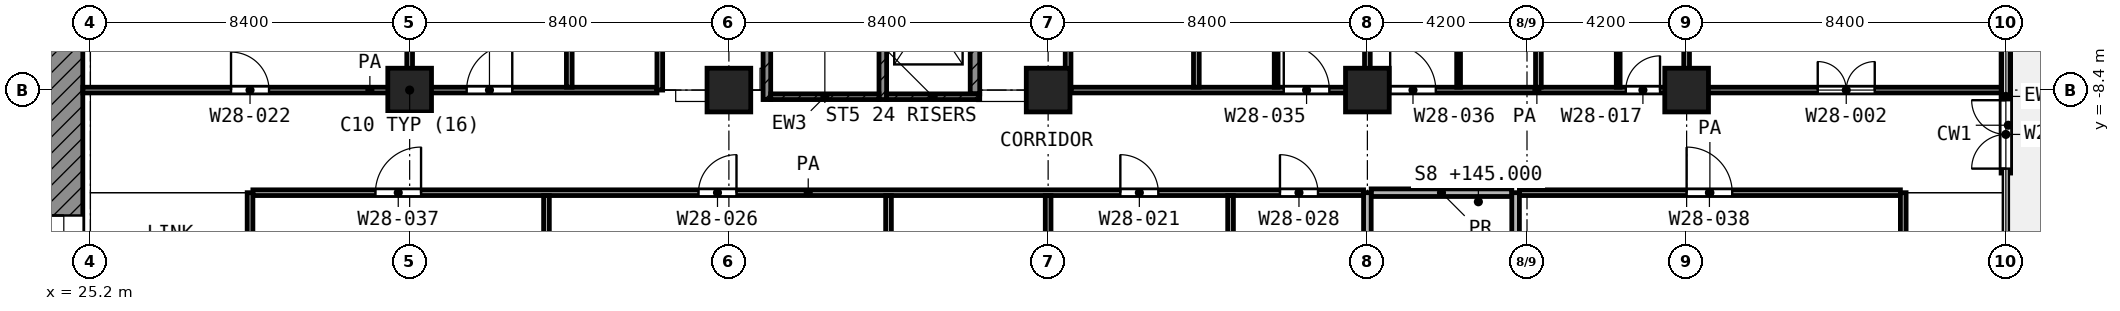
"""IFC4 building model, lengths in metres.
Left out: names, types, materials, properties, quantities, classifications, styles, units other than length and angle.
Written with IfcOpenShell. Run it as: python <this file> out.ifc"""

import sys

from ifc_helpers import new_model, si_unit, direction, frame, frame_2d, origin, origin_2d, place, context, subcontext, project, spatial, rectangle, extrude, element, fill, save


model = new_model("IFC4")
c1 = context("Model", 3, precision=1e-05, world=origin(), true_north=direction((0.0, 1.0)))
c2 = subcontext(c1, "Body", "Model", "MODEL_VIEW")
j1 = project(units=[si_unit("LENGTHUNIT", "METRE"), si_unit("PLANEANGLEUNIT", "RADIAN")], contexts=[c1])
p1 = place(None, origin())
s1 = spatial("IfcSite", under=j1, at=p1, CompositionType="ELEMENT")
p2 = place(p1, origin())
s2 = spatial("IfcBuilding", under=s1, at=p2, CompositionType="ELEMENT")
p3 = place(p2, frame((0.0, 0.0, 145.0)))
s3 = spatial("IfcBuildingStorey", under=s2, at=p3, CompositionType="ELEMENT", Elevation=145.0)
for number, where, z_axis, x_axis in (
    (1, (33.6, -8.4, 0.0), (0.0, 0.0, 1.0), (1.0, 0.0, 0.0)),
    (2, (42.0, -8.4, 0.0), (0.0, 0.0, 1.0), (1.0, 0.0, 0.0)),
    (3, (50.4, -8.4, 0.0), (0.0, 0.0, 1.0), (1.0, 0.0, 0.0)),
    (4, (58.8, -8.4, 0.0), (0.0, 0.0, 1.0), (1.0, 0.0, 0.0)),
    (5, (67.2, -8.4, 0.0), (0.0, 0.0, 1.0), (1.0, 0.0, 0.0)),
):
    element("IfcColumn", number, at=place(p3, frame(where, z_axis=z_axis, x_axis=x_axis)), inside=s3, PredefinedType="COLUMN", context=c2, shape_type="SweptSolid", body=[
        extrude(rectangle(XDim=1.15, YDim=1.15, at=origin_2d()), origin(), (0.0, 0.0, 1.0), 4.2),
    ])
p4 = place(p3, frame((75.6, -10.583, 0.0), z_axis=(0.0, 0.0, 1.0), x_axis=(0.0, 1.0, 0.0)))
e6 = element("IfcWall", 6, at=p4, inside=s3, PredefinedType="SOLIDWALL", context=c2, shape_type="SweptSolid", body=[
    extrude(rectangle(XDim=4.033, YDim=0.25, at=frame_2d((2.017, 0.0))), origin(), (0.0, 0.0, 1.0), 3.48),
])
p5 = place(p4, frame((0.117, 0.0, 0.0)))
e7 = element("IfcOpeningElement", 7, at=p5, cuts=e6, PredefinedType="OPENING", context=c2, shape_type="SweptSolid", body=[
    extrude(rectangle(XDim=1.8, YDim=2.1, at=frame_2d((0.9, 1.05))), frame((0.0, 0.135, 0.0), z_axis=(0.0, -1.0, 0.0), x_axis=(1.0, 0.0, 0.0)), (0.0, 0.0, 1.0), 0.27),
])
p6 = place(p3, frame((24.5, -24.0, 0.0), z_axis=(0.0, 0.0, 1.0), x_axis=(0.0, 1.0, 0.0)))
e8 = element("IfcWall", 8, at=p6, inside=s3, PredefinedType="SHEAR", context=c2, shape_type="SweptSolid", body=[
    extrude(rectangle(XDim=18.6, YDim=1.0, at=frame_2d((9.3, 0.0))), origin(), (0.0, 0.0, 1.0), 3.6),
])
p7 = place(p6, frame((10.5, 0.0, 0.0)))
e9 = element("IfcOpeningElement", 9, at=p7, cuts=e8, PredefinedType="OPENING", context=c2, shape_type="SweptSolid", body=[
    extrude(rectangle(XDim=1.8, YDim=2.1, at=frame_2d((0.9, 1.05))), frame((0.0, 0.51, 0.0), z_axis=(0.0, -1.0, 0.0), x_axis=(1.0, 0.0, 0.0)), (0.0, 0.0, 1.0), 1.02),
])
p8 = place(p3, frame((43.0, -8.65, 0.0), z_axis=(0.0, 0.0, 1.0), x_axis=(0.0, 1.0, 0.0)))
e10 = element("IfcWall", 10, at=p8, inside=s3, PredefinedType="SHEAR", context=c2, shape_type="SweptSolid", body=[
    extrude(rectangle(XDim=8.35, YDim=0.2, at=frame_2d((4.175, 0.0))), origin(), (0.0, 0.0, 1.0), 3.6),
])
p9 = place(p8, frame((7.0, 0.0, 0.0)))
e11 = element("IfcOpeningElement", 11, at=p9, cuts=e10, PredefinedType="OPENING", context=c2, shape_type="SweptSolid", body=[
    extrude(rectangle(XDim=1.1, YDim=2.1, at=frame_2d((0.55, 1.05))), frame((0.0, 0.11, 0.0), z_axis=(0.0, -1.0, 0.0), x_axis=(1.0, 0.0, 0.0)), (0.0, 0.0, 1.0), 0.22),
])
p10 = place(p3, frame((46.05, -8.65, 0.0), z_axis=(0.0, 0.0, 1.0), x_axis=(0.0, 1.0, 0.0)))
e12 = element("IfcWall", 12, at=p10, inside=s3, PredefinedType="SHEAR", context=c2, shape_type="SweptSolid", body=[
    extrude(rectangle(XDim=8.35, YDim=0.2, at=frame_2d((4.175, 0.0))), origin(), (0.0, 0.0, 1.0), 3.6),
])
p11 = place(p10, frame((7.0, 0.0, 0.0)))
e13 = element("IfcOpeningElement", 13, at=p11, cuts=e12, PredefinedType="OPENING", context=c2, shape_type="SweptSolid", body=[
    extrude(rectangle(XDim=1.1, YDim=2.1, at=frame_2d((0.55, 1.05))), frame((0.0, 0.11, 0.0), z_axis=(0.0, -1.0, 0.0), x_axis=(1.0, 0.0, 0.0)), (0.0, 0.0, 1.0), 0.22),
])
p12 = place(p3, frame((43.1, -8.575, 0.0), z_axis=(0.0, 0.0, 1.0), x_axis=(1.0, 0.0, 0.0)))
e14 = element("IfcWall", 14, at=p12, inside=s3, PredefinedType="SHEAR", context=c2, shape_type="SweptSolid", body=[
    extrude(rectangle(XDim=2.85, YDim=0.15, at=frame_2d((1.425, 0.0))), origin(), (0.0, 0.0, 1.0), 3.6),
])
p13 = place(p3, frame((46.15, -8.575, 0.0), z_axis=(0.0, 0.0, 1.0), x_axis=(1.0, 0.0, 0.0)))
e15 = element("IfcWall", 15, at=p13, inside=s3, PredefinedType="SHEAR", context=c2, shape_type="SweptSolid", body=[
    extrude(rectangle(XDim=2.45, YDim=0.15, at=frame_2d((1.225, 0.0))), origin(), (0.0, 0.0, 1.0), 3.6),
])
p14 = place(p3, frame((48.475, -8.5, 0.0), z_axis=(0.0, 0.0, 1.0), x_axis=(0.0, 1.0, 0.0)))
e16 = element("IfcWall", 16, at=p14, inside=s3, PredefinedType="SHEAR", context=c2, shape_type="SweptSolid", body=[
    extrude(rectangle(XDim=3.475, YDim=0.25, at=frame_2d((1.738, 0.0))), origin(), (0.0, 0.0, 1.0), 3.6),
])
for number, where, z_axis, x_axis in (
    (17, (56.4, -8.325, 0.0), (0.0, 0.0, 1.0), (0.0, 1.0, 0.0)),
    (18, (61.2, -8.325, 0.0), (0.0, 0.0, 1.0), (0.0, 1.0, 0.0)),
    (19, (65.4, -8.325, 0.0), (0.0, 0.0, 1.0), (0.0, 1.0, 0.0)),
):
    element("IfcWall", number, at=place(p3, frame(where, z_axis=z_axis, x_axis=x_axis)), inside=s3, PredefinedType="PARTITIONING", context=c2, shape_type="SweptSolid", body=[
        extrude(rectangle(XDim=2.625, YDim=0.1, at=frame_2d((1.312, 0.0))), origin(), (0.0, 0.0, 1.0), 3.6),
    ])
p15 = place(p3, frame((29.475, -11.1, 0.0), z_axis=(0.0, 0.0, 1.0), x_axis=(1.0, 0.0, 0.0)))
e20 = element("IfcWall", 20, at=p15, inside=s3, PredefinedType="PARTITIONING", context=c2, shape_type="SweptSolid", body=[
    extrude(rectangle(XDim=29.225, YDim=0.15, at=frame_2d((14.612, 0.0))), origin(), (0.0, 0.0, 1.0), 3.6),
])
p16 = place(p15, frame((3.225, 0.0, 0.0)))
e21 = element("IfcOpeningElement", 21, at=p16, cuts=e20, PredefinedType="OPENING", context=c2, shape_type="SweptSolid", body=[
    extrude(rectangle(XDim=1.2, YDim=2.1, at=frame_2d((0.6, 1.05))), frame((0.0, 0.085, 0.0), z_axis=(0.0, -1.0, 0.0), x_axis=(1.0, 0.0, 0.0)), (0.0, 0.0, 1.0), 0.17),
])
p17 = place(p15, frame((11.725, 0.0, 0.0)))
e22 = element("IfcOpeningElement", 22, at=p17, cuts=e20, PredefinedType="OPENING", context=c2, shape_type="SweptSolid", body=[
    extrude(rectangle(XDim=1.0, YDim=2.1, at=frame_2d((0.5, 1.05))), frame((0.0, 0.085, 0.0), z_axis=(0.0, -1.0, 0.0), x_axis=(1.0, 0.0, 0.0)), (0.0, 0.0, 1.0), 0.17),
])
p18 = place(p15, frame((22.825, 0.0, 0.0)))
e23 = element("IfcOpeningElement", 23, at=p18, cuts=e20, PredefinedType="OPENING", context=c2, shape_type="SweptSolid", body=[
    extrude(rectangle(XDim=1.0, YDim=2.1, at=frame_2d((0.5, 1.05))), frame((0.0, 0.085, 0.0), z_axis=(0.0, -1.0, 0.0), x_axis=(1.0, 0.0, 0.0)), (0.0, 0.0, 1.0), 0.17),
])
p19 = place(p15, frame((27.025, 0.0, 0.0)))
e24 = element("IfcOpeningElement", 24, at=p19, cuts=e20, PredefinedType="OPENING", context=c2, shape_type="SweptSolid", body=[
    extrude(rectangle(XDim=1.0, YDim=2.1, at=frame_2d((0.5, 1.05))), frame((0.0, 0.085, 0.0), z_axis=(0.0, -1.0, 0.0), x_axis=(1.0, 0.0, 0.0)), (0.0, 0.0, 1.0), 0.17),
])
p20 = place(p3, frame((62.8, -11.1, 0.0), z_axis=(0.0, 0.0, 1.0), x_axis=(1.0, 0.0, 0.0)))
e25 = element("IfcWall", 25, at=p20, inside=s3, PredefinedType="PARTITIONING", context=c2, shape_type="SweptSolid", body=[
    extrude(rectangle(XDim=10.025, YDim=0.15, at=frame_2d((5.012, 0.0))), origin(), (0.0, 0.0, 1.0), 3.6),
])
p21 = place(p20, frame((4.4, 0.0, 0.0)))
e26 = element("IfcOpeningElement", 26, at=p21, cuts=e25, PredefinedType="OPENING", context=c2, shape_type="SweptSolid", body=[
    extrude(rectangle(XDim=1.2, YDim=2.1, at=frame_2d((0.6, 1.05))), frame((0.0, 0.085, 0.0), z_axis=(0.0, -1.0, 0.0), x_axis=(1.0, 0.0, 0.0)), (0.0, 0.0, 1.0), 0.17),
])
p22 = place(p3, frame((25.0, -8.4, 0.0), z_axis=(0.0, 0.0, 1.0), x_axis=(1.0, 0.0, 0.0)))
e27 = element("IfcWall", 27, at=p22, inside=s3, PredefinedType="PARTITIONING", context=c2, shape_type="SweptSolid", body=[
    extrude(rectangle(XDim=15.107, YDim=0.15, at=frame_2d((7.553, 0.0))), origin(), (0.0, 0.0, 1.0), 3.6),
])
p23 = place(p22, frame((3.9, 0.0, 0.0)))
e28 = element("IfcOpeningElement", 28, at=p23, cuts=e27, PredefinedType="OPENING", context=c2, shape_type="SweptSolid", body=[
    extrude(rectangle(XDim=1.0, YDim=2.1, at=frame_2d((0.5, 1.05))), frame((0.0, 0.085, 0.0), z_axis=(0.0, -1.0, 0.0), x_axis=(1.0, 0.0, 0.0)), (0.0, 0.0, 1.0), 0.17),
])
p24 = place(p22, frame((10.1, 0.0, 0.0)))
e29 = element("IfcOpeningElement", 29, at=p24, cuts=e27, PredefinedType="OPENING", context=c2, shape_type="SweptSolid", body=[
    extrude(rectangle(XDim=1.2, YDim=2.1, at=frame_2d((0.6, 1.05))), frame((0.0, 0.085, 0.0), z_axis=(0.0, -1.0, 0.0), x_axis=(1.0, 0.0, 0.0)), (0.0, 0.0, 1.0), 0.17),
])
p25 = place(p3, frame((51.0, -8.4, 0.0), z_axis=(0.0, 0.0, 1.0), x_axis=(1.0, 0.0, 0.0)))
e30 = element("IfcWall", 30, at=p25, inside=s3, PredefinedType="PARTITIONING", context=c2, shape_type="SweptSolid", body=[
    extrude(rectangle(XDim=24.52, YDim=0.15, at=frame_2d((12.26, 0.0))), origin(), (0.0, 0.0, 1.0), 3.6),
])
p26 = place(p25, frame((5.6, 0.0, 0.0)))
e31 = element("IfcOpeningElement", 31, at=p26, cuts=e30, PredefinedType="OPENING", context=c2, shape_type="SweptSolid", body=[
    extrude(rectangle(XDim=1.2, YDim=2.1, at=frame_2d((0.6, 1.05))), frame((0.0, 0.085, 0.0), z_axis=(0.0, -1.0, 0.0), x_axis=(1.0, 0.0, 0.0)), (0.0, 0.0, 1.0), 0.17),
])
p27 = place(p25, frame((8.4, 0.0, 0.0)))
e32 = element("IfcOpeningElement", 32, at=p27, cuts=e30, PredefinedType="OPENING", context=c2, shape_type="SweptSolid", body=[
    extrude(rectangle(XDim=1.2, YDim=2.1, at=frame_2d((0.6, 1.05))), frame((0.0, 0.085, 0.0), z_axis=(0.0, -1.0, 0.0), x_axis=(1.0, 0.0, 0.0)), (0.0, 0.0, 1.0), 0.17),
])
p28 = place(p25, frame((14.6, 0.0, 0.0)))
e33 = element("IfcOpeningElement", 33, at=p28, cuts=e30, PredefinedType="OPENING", context=c2, shape_type="SweptSolid", body=[
    extrude(rectangle(XDim=0.9, YDim=2.1, at=frame_2d((0.45, 1.05))), frame((0.0, 0.085, 0.0), z_axis=(0.0, -1.0, 0.0), x_axis=(1.0, 0.0, 0.0)), (0.0, 0.0, 1.0), 0.17),
])
p29 = place(p25, frame((19.65, 0.0, 0.0)))
e34 = element("IfcOpeningElement", 34, at=p29, cuts=e30, PredefinedType="OPENING", context=c2, shape_type="SweptSolid", body=[
    extrude(rectangle(XDim=1.5, YDim=2.1, at=frame_2d((0.75, 1.05))), frame((0.0, 0.085, 0.0), z_axis=(0.0, -1.0, 0.0), x_axis=(1.0, 0.0, 0.0)), (0.0, 0.0, 1.0), 0.17),
])
p30 = place(p3, frame((29.4, -14.1, 0.0), z_axis=(0.0, 0.0, 1.0), x_axis=(0.0, 1.0, 0.0)))
e35 = element("IfcWall", 35, at=p30, inside=s3, PredefinedType="PARTITIONING", context=c2, shape_type="SweptSolid", body=[
    extrude(rectangle(XDim=3.0, YDim=0.15, at=frame_2d((1.5, 0.0))), origin(), (0.0, 0.0, 1.0), 3.6),
])
p31 = place(p3, frame((33.6, -8.325, 0.0), z_axis=(0.0, 0.0, 1.0), x_axis=(0.0, 1.0, 0.0)))
e36 = element("IfcWall", 36, at=p31, inside=s3, PredefinedType="PARTITIONING", context=c2, shape_type="SweptSolid", body=[
    extrude(rectangle(XDim=8.322, YDim=0.15, at=frame_2d((4.161, 0.0))), origin(), (0.0, 0.0, 1.0), 3.6),
])
p32 = place(p3, frame((37.2, -14.025, 0.0), z_axis=(0.0, 0.0, 1.0), x_axis=(0.0, 1.0, 0.0)))
e37 = element("IfcWall", 37, at=p32, inside=s3, PredefinedType="PARTITIONING", context=c2, shape_type="SweptSolid", body=[
    extrude(rectangle(XDim=2.85, YDim=0.15, at=frame_2d((1.425, 0.0))), origin(), (0.0, 0.0, 1.0), 3.6),
])
p33 = place(p3, frame((37.8, -8.325, 0.0), z_axis=(0.0, 0.0, 1.0), x_axis=(0.0, 1.0, 0.0)))
e38 = element("IfcWall", 38, at=p33, inside=s3, PredefinedType="PARTITIONING", context=c2, shape_type="SweptSolid", body=[
    extrude(rectangle(XDim=8.322, YDim=0.15, at=frame_2d((4.161, 0.0))), origin(), (0.0, 0.0, 1.0), 3.6),
])
p34 = place(p3, frame((40.182, -8.4, 0.0), z_axis=(0.0, 0.0, 1.0), x_axis=(0.0, 1.0, 0.0)))
e39 = element("IfcWall", 39, at=p34, inside=s3, PredefinedType="PARTITIONING", context=c2, shape_type="SweptSolid", body=[
    extrude(rectangle(XDim=8.05, YDim=0.15, at=frame_2d((4.025, 0.0))), origin(), (0.0, 0.0, 1.0), 3.6),
])
p35 = place(p34, frame((3.525, 0.0, 0.0)))
e40 = element("IfcOpeningElement", 40, at=p35, cuts=e39, PredefinedType="OPENING", context=c2, shape_type="SweptSolid", body=[
    extrude(rectangle(XDim=1.0, YDim=2.1, at=frame_2d((0.5, 1.05))), frame((0.0, 0.085, 0.0), z_axis=(0.0, -1.0, 0.0), x_axis=(1.0, 0.0, 0.0)), (0.0, 0.0, 1.0), 0.17),
])
for number, where, z_axis, x_axis in (
    (41, (46.2, -14.025, 0.0), (0.0, 0.0, 1.0), (0.0, 1.0, 0.0)),
    (42, (50.4, -14.025, 0.0), (0.0, 0.0, 1.0), (0.0, 1.0, 0.0)),
):
    element("IfcWall", number, at=place(p3, frame(where, z_axis=z_axis, x_axis=x_axis)), inside=s3, PredefinedType="PARTITIONING", context=c2, shape_type="SweptSolid", body=[
        extrude(rectangle(XDim=2.85, YDim=0.15, at=frame_2d((1.425, 0.0))), origin(), (0.0, 0.0, 1.0), 3.6),
    ])
p36 = place(p3, frame((50.925, -8.4, 0.0), z_axis=(0.0, 0.0, 1.0), x_axis=(0.0, 1.0, 0.0)))
e43 = element("IfcWall", 43, at=p36, inside=s3, PredefinedType="PARTITIONING", context=c2, shape_type="SweptSolid", body=[
    extrude(rectangle(XDim=6.55, YDim=0.15, at=frame_2d((3.275, 0.0))), origin(), (0.0, 0.0, 1.0), 3.6),
])
p37 = place(p36, frame((2.775, 0.0, 0.0)))
e44 = element("IfcOpeningElement", 44, at=p37, cuts=e43, PredefinedType="OPENING", context=c2, shape_type="SweptSolid", body=[
    extrude(rectangle(XDim=1.0, YDim=2.1, at=frame_2d((0.5, 1.05))), frame((0.0, 0.085, 0.0), z_axis=(0.0, -1.0, 0.0), x_axis=(1.0, 0.0, 0.0)), (0.0, 0.0, 1.0), 0.17),
])
p38 = place(p3, frame((54.3, -8.325, 0.0), z_axis=(0.0, 0.0, 1.0), x_axis=(0.0, 1.0, 0.0)))
e45 = element("IfcWall", 45, at=p38, inside=s3, PredefinedType="PARTITIONING", context=c2, shape_type="SweptSolid", body=[
    extrude(rectangle(XDim=8.25, YDim=0.15, at=frame_2d((4.125, 0.0))), origin(), (0.0, 0.0, 1.0), 3.6),
])
p39 = place(p3, frame((55.2, -14.025, 0.0), z_axis=(0.0, 0.0, 1.0), x_axis=(0.0, 1.0, 0.0)))
e46 = element("IfcWall", 46, at=p39, inside=s3, PredefinedType="PARTITIONING", context=c2, shape_type="SweptSolid", body=[
    extrude(rectangle(XDim=2.85, YDim=0.15, at=frame_2d((1.425, 0.0))), origin(), (0.0, 0.0, 1.0), 3.6),
])
p40 = place(p3, frame((58.8, -8.325, 0.0), z_axis=(0.0, 0.0, 1.0), x_axis=(0.0, 1.0, 0.0)))
e47 = element("IfcWall", 47, at=p40, inside=s3, PredefinedType="PARTITIONING", context=c2, shape_type="SweptSolid", body=[
    extrude(rectangle(XDim=8.25, YDim=0.15, at=frame_2d((4.125, 0.0))), origin(), (0.0, 0.0, 1.0), 3.6),
])
p41 = place(p3, frame((63.3, -8.325, 0.0), z_axis=(0.0, 0.0, 1.0), x_axis=(0.0, 1.0, 0.0)))
e48 = element("IfcWall", 48, at=p41, inside=s3, PredefinedType="PARTITIONING", context=c2, shape_type="SweptSolid", body=[
    extrude(rectangle(XDim=8.325, YDim=0.15, at=frame_2d((4.163, 0.0))), origin(), (0.0, 0.0, 1.0), 3.6),
])
p42 = place(p3, frame((67.2, -8.325, 0.0), z_axis=(0.0, 0.0, 1.0), x_axis=(0.0, 1.0, 0.0)))
e49 = element("IfcWall", 49, at=p42, inside=s3, PredefinedType="PARTITIONING", context=c2, shape_type="SweptSolid", body=[
    extrude(rectangle(XDim=8.323, YDim=0.15, at=frame_2d((4.162, 0.0))), origin(), (0.0, 0.0, 1.0), 3.6),
])
p43 = place(p3, frame((72.9, -14.1, 0.0), z_axis=(0.0, 0.0, 1.0), x_axis=(0.0, 1.0, 0.0)))
e50 = element("IfcWall", 50, at=p43, inside=s3, PredefinedType="PARTITIONING", context=c2, shape_type="SweptSolid", body=[
    extrude(rectangle(XDim=3.0, YDim=0.15, at=frame_2d((1.5, 0.0))), origin(), (0.0, 0.0, 1.0), 3.6),
])
p44 = place(p3, frame((58.9, -11.1, 0.0), z_axis=(0.0, 0.0, 1.0), x_axis=(1.0, 0.0, 0.0)))
e51 = element("IfcWall", 51, at=p44, inside=s3, PredefinedType="PARTITIONING", context=c2, shape_type="SweptSolid", body=[
    extrude(rectangle(XDim=3.7, YDim=0.2, at=frame_2d((1.85, 0.0))), origin(), (0.0, 0.0, 1.0), 3.6),
])
for number, where, z_axis, x_axis in (
    (52, (58.8, -14.1, 0.0), (0.0, 0.0, 1.0), (0.0, 1.0, 0.0)),
    (53, (62.7, -14.1, 0.0), (0.0, 0.0, 1.0), (0.0, 1.0, 0.0)),
):
    element("IfcWall", number, at=place(p3, frame(where, z_axis=z_axis, x_axis=x_axis)), inside=s3, PredefinedType="PARTITIONING", context=c2, shape_type="SweptSolid", body=[
        extrude(rectangle(XDim=3.0, YDim=0.2, at=frame_2d((1.5, 0.0))), origin(), (0.0, 0.0, 1.0), 3.6),
    ])
p45 = place(p5, origin())
e54 = element("IfcDoor", 54, at=p45, inside=s3, OperationType="DOUBLE_DOOR_SINGLE_SWING", PredefinedType="DOOR", context=c2, shape_type="SweptSolid", body=[
    extrude(rectangle(XDim=1.8, YDim=2.1, at=frame_2d((0.9, 1.05))), frame((0.0, 0.025, 0.0), z_axis=(0.0, -1.0, 0.0), x_axis=(1.0, 0.0, 0.0)), (0.0, 0.0, 1.0), 0.05),
])
fill(e7, e54)
p46 = place(p7, origin())
e55 = element("IfcDoor", 55, at=p46, inside=s3, OperationType="DOUBLE_DOOR_SINGLE_SWING", PredefinedType="DOOR", context=c2, shape_type="SweptSolid", body=[
    extrude(rectangle(XDim=1.8, YDim=2.1, at=frame_2d((0.9, 1.05))), frame((0.0, 0.025, 0.0), z_axis=(0.0, -1.0, 0.0), x_axis=(1.0, 0.0, 0.0)), (0.0, 0.0, 1.0), 0.05),
])
fill(e9, e55)
p47 = place(p23, origin())
e56 = element("IfcDoor", 56, at=p47, inside=s3, OperationType="SINGLE_SWING_LEFT", PredefinedType="DOOR", context=c2, shape_type="SweptSolid", body=[
    extrude(rectangle(XDim=1.0, YDim=2.1, at=frame_2d((0.5, 1.05))), frame((0.0, 0.025, 0.0), z_axis=(0.0, -1.0, 0.0), x_axis=(1.0, 0.0, 0.0)), (0.0, 0.0, 1.0), 0.05),
])
fill(e28, e56)
p48 = place(p24, origin())
e57 = element("IfcDoor", 57, at=p48, inside=s3, OperationType="SINGLE_SWING_RIGHT", PredefinedType="DOOR", context=c2, shape_type="SweptSolid", body=[
    extrude(rectangle(XDim=1.2, YDim=2.1, at=frame_2d((0.6, 1.05))), frame((0.0, 0.025, 0.0), z_axis=(0.0, -1.0, 0.0), x_axis=(1.0, 0.0, 0.0)), (0.0, 0.0, 1.0), 0.05),
])
fill(e29, e57)
p49 = place(p26, origin())
e58 = element("IfcDoor", 58, at=p49, inside=s3, OperationType="SINGLE_SWING_LEFT", PredefinedType="DOOR", context=c2, shape_type="SweptSolid", body=[
    extrude(rectangle(XDim=1.2, YDim=2.1, at=frame_2d((0.6, 1.05))), frame((0.0, 0.025, 0.0), z_axis=(0.0, -1.0, 0.0), x_axis=(1.0, 0.0, 0.0)), (0.0, 0.0, 1.0), 0.05),
])
fill(e31, e58)
p50 = place(p27, origin())
e59 = element("IfcDoor", 59, at=p50, inside=s3, OperationType="SINGLE_SWING_LEFT", PredefinedType="DOOR", context=c2, shape_type="SweptSolid", body=[
    extrude(rectangle(XDim=1.2, YDim=2.1, at=frame_2d((0.6, 1.05))), frame((0.0, 0.025, 0.0), z_axis=(0.0, -1.0, 0.0), x_axis=(1.0, 0.0, 0.0)), (0.0, 0.0, 1.0), 0.05),
])
fill(e32, e59)
p51 = place(p28, origin())
e60 = element("IfcDoor", 60, at=p51, inside=s3, OperationType="SINGLE_SWING_RIGHT", PredefinedType="DOOR", context=c2, shape_type="SweptSolid", body=[
    extrude(rectangle(XDim=0.9, YDim=2.1, at=frame_2d((0.45, 1.05))), frame((0.0, 0.025, 0.0), z_axis=(0.0, -1.0, 0.0), x_axis=(1.0, 0.0, 0.0)), (0.0, 0.0, 1.0), 0.05),
])
fill(e33, e60)
p52 = place(p29, origin())
e61 = element("IfcDoor", 61, at=p52, inside=s3, OperationType="DOUBLE_DOOR_SINGLE_SWING", PredefinedType="DOOR", context=c2, shape_type="SweptSolid", body=[
    extrude(rectangle(XDim=1.5, YDim=2.1, at=frame_2d((0.75, 1.05))), frame((0.0, 0.025, 0.0), z_axis=(0.0, -1.0, 0.0), x_axis=(1.0, 0.0, 0.0)), (0.0, 0.0, 1.0), 0.05),
])
fill(e34, e61)
p53 = place(p16, origin())
e62 = element("IfcDoor", 62, at=p53, inside=s3, OperationType="SINGLE_SWING_RIGHT", PredefinedType="DOOR", context=c2, shape_type="SweptSolid", body=[
    extrude(rectangle(XDim=1.2, YDim=2.1, at=frame_2d((0.6, 1.05))), frame((0.0, 0.025, 0.0), z_axis=(0.0, -1.0, 0.0), x_axis=(1.0, 0.0, 0.0)), (0.0, 0.0, 1.0), 0.05),
])
fill(e21, e62)
p54 = place(p17, origin())
e63 = element("IfcDoor", 63, at=p54, inside=s3, OperationType="SINGLE_SWING_RIGHT", PredefinedType="DOOR", context=c2, shape_type="SweptSolid", body=[
    extrude(rectangle(XDim=1.0, YDim=2.1, at=frame_2d((0.5, 1.05))), frame((0.0, 0.025, 0.0), z_axis=(0.0, -1.0, 0.0), x_axis=(1.0, 0.0, 0.0)), (0.0, 0.0, 1.0), 0.05),
])
fill(e22, e63)
p55 = place(p18, origin())
e64 = element("IfcDoor", 64, at=p55, inside=s3, OperationType="SINGLE_SWING_LEFT", PredefinedType="DOOR", context=c2, shape_type="SweptSolid", body=[
    extrude(rectangle(XDim=1.0, YDim=2.1, at=frame_2d((0.5, 1.05))), frame((0.0, 0.025, 0.0), z_axis=(0.0, -1.0, 0.0), x_axis=(1.0, 0.0, 0.0)), (0.0, 0.0, 1.0), 0.05),
])
fill(e23, e64)
p56 = place(p19, origin())
e65 = element("IfcDoor", 65, at=p56, inside=s3, OperationType="SINGLE_SWING_LEFT", PredefinedType="DOOR", context=c2, shape_type="SweptSolid", body=[
    extrude(rectangle(XDim=1.0, YDim=2.1, at=frame_2d((0.5, 1.05))), frame((0.0, 0.025, 0.0), z_axis=(0.0, -1.0, 0.0), x_axis=(1.0, 0.0, 0.0)), (0.0, 0.0, 1.0), 0.05),
])
fill(e24, e65)
p57 = place(p21, origin())
e66 = element("IfcDoor", 66, at=p57, inside=s3, OperationType="SINGLE_SWING_LEFT", PredefinedType="DOOR", context=c2, shape_type="SweptSolid", body=[
    extrude(rectangle(XDim=1.2, YDim=2.1, at=frame_2d((0.6, 1.05))), frame((0.0, 0.025, 0.0), z_axis=(0.0, -1.0, 0.0), x_axis=(1.0, 0.0, 0.0)), (0.0, 0.0, 1.0), 0.05),
])
fill(e26, e66)
save(model, sys.argv[1])
